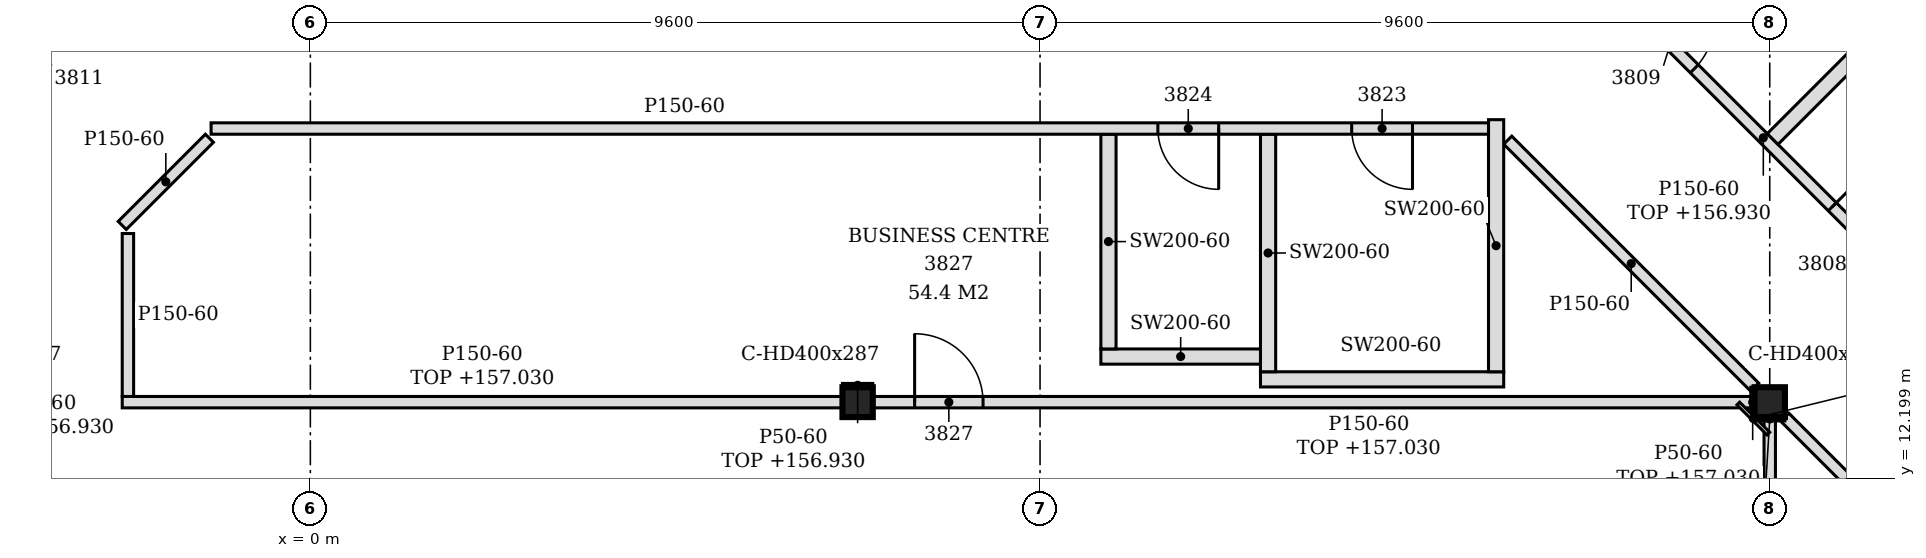
"""IFC4 building model, lengths in metres.
Left out: names, types, materials, properties, quantities, classifications, styles, units other than length and angle.
Written with IfcOpenShell. Run it as: python <this file> out.ifc"""

import sys

from ifc_helpers import new_model, si_unit, direction, frame, frame_2d, origin, origin_2d, place, context, subcontext, project, spatial, polyline, rectangle, i_section, outline, extrude, element, fill, save


model = new_model("IFC4")
c1 = context("Model", 3, precision=1e-05, world=origin(), true_north=direction((0.0, 1.0)))
c2 = subcontext(c1, "Body", "Model", "MODEL_VIEW")
j1 = project(units=[si_unit("LENGTHUNIT", "METRE"), si_unit("PLANEANGLEUNIT", "RADIAN")], contexts=[c1])
p1 = place(None, origin())
s1 = spatial("IfcSite", under=j1, at=p1, CompositionType="ELEMENT")
p2 = place(p1, origin())
s2 = spatial("IfcBuilding", under=s1, at=p2, CompositionType="ELEMENT")
p3 = place(p2, frame((0.0, 0.0, 154.2)))
s3 = spatial("IfcBuildingStorey", under=s2, at=p3, CompositionType="ELEMENT", Elevation=154.2)
for number, where, z_axis, x_axis in (
    (1, (7.2, 13.2, -0.15), (0.0, 0.0, 1.0), (1.0, 0.0, 0.0)),
    (2, (19.2, 13.2, -0.15), (0.0, 0.0, 1.0), (1.0, 0.0, 0.0)),
):
    element("IfcColumn", number, at=place(p3, frame(where, z_axis=z_axis, x_axis=x_axis)), inside=s3, PredefinedType="COLUMN", context=c2, shape_type="SweptSolid", body=[
        extrude(i_section(OverallWidth=0.399, OverallDepth=0.393, WebThickness=0.023, FlangeThickness=0.037, FilletRadius=0.015, at=origin_2d()), origin(), (0.0, 0.0, 1.0), 3.6),
    ])
p4 = place(p3, frame((19.2, 2.596, 0.0), z_axis=(0.0, 0.0, 1.0), x_axis=(0.0, 1.0, 0.0)))
e3 = element("IfcWall", 3, at=p4, inside=s3, PredefinedType="PARTITIONING", context=c2, shape_type="SweptSolid", body=[
    extrude(rectangle(XDim=10.407, YDim=0.15, at=frame_2d((5.204, 0.0))), origin(), (0.0, 0.0, 1.0), 2.83),
])
p5 = place(p4, frame((2.954, 0.0, 0.0)))
e4 = element("IfcOpeningElement", 4, at=p5, cuts=e3, PredefinedType="OPENING", context=c2, shape_type="SweptSolid", body=[
    extrude(rectangle(XDim=0.9, YDim=2.1, at=frame_2d((0.45, 1.05))), frame((0.0, 0.085, 0.0), z_axis=(0.0, -1.0, 0.0), x_axis=(1.0, 0.0, 0.0)), (0.0, 0.0, 1.0), 0.17),
])
p6 = place(p3, frame((23.872, 8.528, 0.0), z_axis=(0.0, 0.0, 1.0), x_axis=(-0.707126073897, 0.70708748795, 0.0)))
e5 = element("IfcWall", 5, at=p6, inside=s3, PredefinedType="PARTITIONING", context=c2, shape_type="SweptSolid", body=[
    extrude(rectangle(XDim=6.327, YDim=0.15, at=frame_2d((3.164, 0.0))), origin(), (0.0, 0.0, 1.0), 2.88),
])
p7 = place(p3, frame((-12.075, 9.319, 0.0), z_axis=(0.0, 0.0, 1.0), x_axis=(0.707106781187, 0.707106781187, 0.0)))
e6 = element("IfcWall", 6, at=p7, inside=s3, PredefinedType="PARTITIONING", context=c2, shape_type="SweptSolid", body=[
    extrude(rectangle(XDim=13.793, YDim=0.15, at=frame_2d((6.896, 0.0))), origin(), (0.0, 0.0, 1.0), 2.73),
])
p8 = place(p7, frame((11.692, 0.0, 0.0)))
e7 = element("IfcOpeningElement", 7, at=p8, cuts=e6, PredefinedType="OPENING", context=c2, shape_type="SweptSolid", body=[
    extrude(rectangle(XDim=0.9, YDim=2.1, at=frame_2d((0.45, 1.05))), frame((0.0, 0.085, 0.0), z_axis=(0.0, -1.0, 0.0), x_axis=(1.0, 0.0, 0.0)), (0.0, 0.0, 1.0), 0.17),
])
p9 = place(p7, frame((7.376, 0.0, 0.0)))
e8 = element("IfcOpeningElement", 8, at=p9, cuts=e6, PredefinedType="OPENING", context=c2, shape_type="SweptSolid", body=[
    extrude(rectangle(XDim=0.9, YDim=2.1, at=frame_2d((0.45, 1.05))), frame((0.0, 0.085, 0.0), z_axis=(0.0, -1.0, 0.0), x_axis=(1.0, 0.0, 0.0)), (0.0, 0.0, 1.0), 0.17),
])
p10 = place(p7, frame((3.62, 0.0, 0.0)))
e9 = element("IfcOpeningElement", 9, at=p10, cuts=e6, PredefinedType="OPENING", context=c2, shape_type="SweptSolid", body=[
    extrude(rectangle(XDim=0.9, YDim=2.1, at=frame_2d((0.45, 1.05))), frame((0.0, 0.085, 0.0), z_axis=(0.0, -1.0, 0.0), x_axis=(1.0, 0.0, 0.0)), (0.0, 0.0, 1.0), 0.17),
])
p11 = place(p3, frame((26.272, 9.522, 0.0), z_axis=(0.0, 0.0, 1.0), x_axis=(-0.707097742657, 0.707115819601, 0.0)))
e10 = element("IfcWall", 10, at=p11, inside=s3, PredefinedType="PARTITIONING", context=c2, shape_type="SweptSolid", body=[
    extrude(rectangle(XDim=13.506, YDim=0.15, at=frame_2d((6.753, 0.0))), origin(), (0.0, 0.0, 1.0), 2.73),
])
p12 = place(p11, frame((1.398, 0.0, 0.0)))
e11 = element("IfcOpeningElement", 11, at=p12, cuts=e10, PredefinedType="OPENING", context=c2, shape_type="SweptSolid", body=[
    extrude(rectangle(XDim=0.9, YDim=2.1, at=frame_2d((0.45, 1.05))), frame((0.0, 0.085, 0.0), z_axis=(0.0, -1.0, 0.0), x_axis=(1.0, 0.0, 0.0)), (0.0, 0.0, 1.0), 0.17),
])
p13 = place(p11, frame((4.668, 0.0, 0.0)))
e12 = element("IfcOpeningElement", 12, at=p13, cuts=e10, PredefinedType="OPENING", context=c2, shape_type="SweptSolid", body=[
    extrude(rectangle(XDim=0.9, YDim=2.1, at=frame_2d((0.45, 1.05))), frame((0.0, 0.085, 0.0), z_axis=(0.0, -1.0, 0.0), x_axis=(1.0, 0.0, 0.0)), (0.0, 0.0, 1.0), 0.17),
])
p14 = place(p11, frame((7.938, 0.0, 0.0)))
e13 = element("IfcOpeningElement", 13, at=p14, cuts=e10, PredefinedType="OPENING", context=c2, shape_type="SweptSolid", body=[
    extrude(rectangle(XDim=0.9, YDim=2.1, at=frame_2d((0.45, 1.05))), frame((0.0, 0.085, 0.0), z_axis=(0.0, -1.0, 0.0), x_axis=(1.0, 0.0, 0.0)), (0.0, 0.0, 1.0), 0.17),
])
p15 = place(p11, frame((11.405, 0.0, 0.0)))
e14 = element("IfcOpeningElement", 14, at=p15, cuts=e10, PredefinedType="OPENING", context=c2, shape_type="SweptSolid", body=[
    extrude(rectangle(XDim=0.9, YDim=2.1, at=frame_2d((0.45, 1.05))), frame((0.0, 0.085, 0.0), z_axis=(0.0, -1.0, 0.0), x_axis=(1.0, 0.0, 0.0)), (0.0, 0.0, 1.0), 0.17),
])
p16 = place(p3, frame((-2.475, 13.2, 0.0), z_axis=(0.0, 0.0, 1.0), x_axis=(1.0, 0.0, 0.0)))
e15 = element("IfcWall", 15, at=p16, inside=s3, PredefinedType="PARTITIONING", context=c2, shape_type="SweptSolid", body=[
    extrude(rectangle(XDim=9.476, YDim=0.15, at=frame_2d((4.738, 0.0))), origin(), (0.0, 0.0, 1.0), 2.83),
])
p17 = place(p3, frame((7.399, 13.2, 0.0), z_axis=(0.0, 0.0, 1.0), x_axis=(1.0, 0.0, 0.0)))
e16 = element("IfcWall", 16, at=p17, inside=s3, PredefinedType="PARTITIONING", context=c2, shape_type="SweptSolid", body=[
    extrude(rectangle(XDim=11.601, YDim=0.15, at=frame_2d((5.801, 0.0))), origin(), (0.0, 0.0, 1.0), 2.83),
])
p18 = place(p17, frame((0.551, 0.0, 0.0)))
e17 = element("IfcOpeningElement", 17, at=p18, cuts=e16, PredefinedType="OPENING", context=c2, shape_type="SweptSolid", body=[
    extrude(rectangle(XDim=0.9, YDim=2.1, at=frame_2d((0.45, 1.05))), frame((0.0, 0.085, 0.0), z_axis=(0.0, -1.0, 0.0), x_axis=(1.0, 0.0, 0.0)), (0.0, 0.0, 1.0), 0.17),
])
p19 = place(p3, frame((-2.4, 13.275, 0.0), z_axis=(0.0, 0.0, 1.0), x_axis=(0.0, 1.0, 0.0)))
e18 = element("IfcWall", 18, at=p19, inside=s3, PredefinedType="PARTITIONING", context=c2, shape_type="SweptSolid", body=[
    extrude(outline(polyline([(0.0, 0.0), (2.144, 0.0), (2.144, 3.45), (0.075, 3.45), (0.073, 2.83), (0.0, 2.83), (0.0, 0.0)])), frame((0.0, 0.075, 0.0), z_axis=(0.0, -1.0, 0.0), x_axis=(1.0, 0.0, 0.0)), (0.0, 0.0, 1.0), 0.15),
])
p20 = place(p3, frame((19.002, 13.398, 0.0), z_axis=(0.0, 0.0, 1.0), x_axis=(-0.707106781187, 0.707106781187, 0.0)))
e19 = element("IfcWall", 19, at=p20, inside=s3, PredefinedType="PARTITIONING", context=c2, shape_type="SweptSolid", body=[
    extrude(rectangle(XDim=4.595, YDim=0.15, at=frame_2d((2.297, 0.0))), origin(), (0.0, 0.0, 1.0), 3.45),
])
p21 = place(p3, frame((12.5, 13.5, 0.0), z_axis=(0.0, 0.0, 1.0), x_axis=(1.0, 0.0, 0.0)))
e20 = element("IfcWall", 20, at=p21, inside=s3, PredefinedType="PARTITIONING", context=c2, shape_type="SweptSolid", body=[
    extrude(rectangle(XDim=3.2, YDim=0.2, at=frame_2d((1.6, 0.0))), origin(), (0.0, 0.0, 1.0), 3.45),
])
p22 = place(p3, frame((12.6, 13.6, 0.0), z_axis=(0.0, 0.0, 1.0), x_axis=(0.0, 1.0, 0.0)))
e21 = element("IfcWall", 21, at=p22, inside=s3, PredefinedType="PARTITIONING", context=c2, shape_type="SweptSolid", body=[
    extrude(rectangle(XDim=3.125, YDim=0.2, at=frame_2d((1.562, 0.0))), origin(), (0.0, 0.0, 1.0), 3.45),
])
p23 = place(p3, frame((15.6, 13.6, 0.0), z_axis=(0.0, 0.0, 1.0), x_axis=(0.0, 1.0, 0.0)))
e22 = element("IfcWall", 22, at=p23, inside=s3, PredefinedType="PARTITIONING", context=c2, shape_type="SweptSolid", body=[
    extrude(rectangle(XDim=3.316, YDim=0.2, at=frame_2d((1.658, 0.0))), origin(), (0.0, 0.0, 1.0), 3.45),
])
p24 = place(p3, frame((10.4, 13.8, 0.0), z_axis=(0.0, 0.0, 1.0), x_axis=(1.0, 0.0, 0.0)))
e23 = element("IfcWall", 23, at=p24, inside=s3, PredefinedType="PARTITIONING", context=c2, shape_type="SweptSolid", body=[
    extrude(rectangle(XDim=2.1, YDim=0.2, at=frame_2d((1.05, 0.0))), origin(), (0.0, 0.0, 1.0), 3.45),
])
p25 = place(p3, frame((10.5, 13.9, 0.0), z_axis=(0.0, 0.0, 1.0), x_axis=(0.0, 1.0, 0.0)))
e24 = element("IfcWall", 24, at=p25, inside=s3, PredefinedType="PARTITIONING", context=c2, shape_type="SweptSolid", body=[
    extrude(rectangle(XDim=2.825, YDim=0.2, at=frame_2d((1.413, 0.0))), origin(), (0.0, 0.0, 1.0), 3.45),
])
p26 = place(p3, frame((-2.475, 15.525, 0.0), z_axis=(0.0, 0.0, 1.0), x_axis=(0.707106781187, 0.707106781187, 0.0)))
e25 = element("IfcWall", 25, at=p26, inside=s3, PredefinedType="PARTITIONING", context=c2, shape_type="SweptSolid", body=[
    extrude(rectangle(XDim=1.622, YDim=0.15, at=frame_2d((0.811, 0.0))), origin(), (0.0, 0.0, 1.0), 3.45),
])
p27 = place(p3, frame((19.238, 16.662, 0.0), z_axis=(0.0, 0.0, 1.0), x_axis=(0.707106781187, 0.707106781187, 0.0)))
e26 = element("IfcWall", 26, at=p27, inside=s3, PredefinedType="PARTITIONING", context=c2, shape_type="SweptSolid", body=[
    extrude(rectangle(XDim=8.929, YDim=0.2, at=frame_2d((4.464, 0.0))), origin(), (0.0, 0.0, 1.0), 2.73),
])
p28 = place(p3, frame((-1.306, 16.8, 0.0), z_axis=(0.0, 0.0, 1.0), x_axis=(1.0, 0.0, 0.0)))
e27 = element("IfcWall", 27, at=p28, inside=s3, PredefinedType="PARTITIONING", context=c2, shape_type="SweptSolid", body=[
    extrude(outline(polyline([(0.0, 0.0), (16.806, 0.0), (16.806, 3.45), (8.656, 3.45), (8.654, 2.73), (8.356, 2.73), (8.354, 3.45), (0.0, 3.45), (0.0, 0.0)])), frame((0.0, 0.075, 0.0), z_axis=(0.0, -1.0, 0.0), x_axis=(1.0, 0.0, 0.0)), (0.0, 0.0, 1.0), 0.15),
])
p29 = place(p28, frame((15.006, 0.0, 0.0)))
e28 = element("IfcOpeningElement", 28, at=p29, cuts=e27, PredefinedType="OPENING", context=c2, shape_type="SweptSolid", body=[
    extrude(rectangle(XDim=0.8, YDim=2.1, at=frame_2d((0.4, 1.05))), frame((0.0, 0.085, 0.0), z_axis=(0.0, -1.0, 0.0), x_axis=(1.0, 0.0, 0.0)), (0.0, 0.0, 1.0), 0.17),
])
p30 = place(p28, frame((12.456, 0.0, 0.0)))
e29 = element("IfcOpeningElement", 29, at=p30, cuts=e27, PredefinedType="OPENING", context=c2, shape_type="SweptSolid", body=[
    extrude(rectangle(XDim=0.8, YDim=2.1, at=frame_2d((0.4, 1.05))), frame((0.0, 0.085, 0.0), z_axis=(0.0, -1.0, 0.0), x_axis=(1.0, 0.0, 0.0)), (0.0, 0.0, 1.0), 0.17),
])
p31 = place(p3, frame((18.976, 13.003, 0.0), z_axis=(0.0, 0.0, 1.0), x_axis=(0.0, 1.0, 0.0)))
e30 = element("IfcWall", 30, at=p31, inside=s3, PredefinedType="PARTITIONING", context=c2, shape_type="SweptSolid", body=[
    extrude(rectangle(XDim=0.393, YDim=0.05, at=frame_2d((0.197, 0.0))), origin(), (0.0, 0.0, 1.0), 2.83),
])
p32 = place(p3, frame((19.182, 12.786, 0.0), z_axis=(0.0, 0.0, 1.0), x_axis=(-0.707106781187, 0.707106781187, 0.0)))
e31 = element("IfcWall", 31, at=p32, inside=s3, PredefinedType="PARTITIONING", context=c2, shape_type="SweptSolid", body=[
    extrude(rectangle(XDim=0.56, YDim=0.05, at=frame_2d((0.28, 0.0))), origin(), (0.0, 0.0, 1.0), 2.83),
])
p33 = place(p3, frame((7.0, 13.421, 0.0), z_axis=(0.0, 0.0, 1.0), x_axis=(1.0, 0.0, 0.0)))
e32 = element("IfcWall", 32, at=p33, inside=s3, PredefinedType="PARTITIONING", context=c2, shape_type="SweptSolid", body=[
    extrude(rectangle(XDim=0.399, YDim=0.05, at=frame_2d((0.199, 0.0))), origin(), (0.0, 0.0, 1.0), 2.73),
])
p34 = place(p3, frame((19.0, 12.979, 0.0), z_axis=(0.0, 0.0, 1.0), x_axis=(1.0, 0.0, 0.0)))
e33 = element("IfcWall", 33, at=p34, inside=s3, PredefinedType="PARTITIONING", context=c2, shape_type="SweptSolid", body=[
    extrude(rectangle(XDim=0.399, YDim=0.05, at=frame_2d((0.199, 0.0))), origin(), (0.0, 0.0, 1.0), 2.83),
])
p35 = place(p14, frame((0.9, 0.0, 0.0), z_axis=(0.0, 0.0, 1.0), x_axis=(-1.0, 0.0, 0.0)))
e34 = element("IfcDoor", 34, at=p35, inside=s3, OperationType="SINGLE_SWING_LEFT", PredefinedType="DOOR", context=c2, shape_type="SweptSolid", body=[
    extrude(rectangle(XDim=0.9, YDim=2.1, at=frame_2d((0.45, 1.05))), frame((0.0, 0.025, 0.0), z_axis=(0.0, -1.0, 0.0), x_axis=(1.0, 0.0, 0.0)), (0.0, 0.0, 1.0), 0.05),
])
fill(e13, e34)
p36 = place(p15, frame((0.9, 0.0, 0.0), z_axis=(0.0, 0.0, 1.0), x_axis=(-1.0, 0.0, 0.0)))
e35 = element("IfcDoor", 35, at=p36, inside=s3, OperationType="SINGLE_SWING_LEFT", PredefinedType="DOOR", context=c2, shape_type="SweptSolid", body=[
    extrude(rectangle(XDim=0.9, YDim=2.1, at=frame_2d((0.45, 1.05))), frame((0.0, 0.025, 0.0), z_axis=(0.0, -1.0, 0.0), x_axis=(1.0, 0.0, 0.0)), (0.0, 0.0, 1.0), 0.05),
])
fill(e14, e35)
p37 = place(p8, origin())
e36 = element("IfcDoor", 36, at=p37, inside=s3, OperationType="SINGLE_SWING_RIGHT", PredefinedType="DOOR", context=c2, shape_type="SweptSolid", body=[
    extrude(rectangle(XDim=0.9, YDim=2.1, at=frame_2d((0.45, 1.05))), frame((0.0, 0.025, 0.0), z_axis=(0.0, -1.0, 0.0), x_axis=(1.0, 0.0, 0.0)), (0.0, 0.0, 1.0), 0.05),
])
fill(e7, e36)
p38 = place(p29, frame((0.8, 0.0, 0.0), z_axis=(0.0, 0.0, 1.0), x_axis=(-1.0, 0.0, 0.0)))
e37 = element("IfcDoor", 37, at=p38, inside=s3, OperationType="SINGLE_SWING_LEFT", PredefinedType="DOOR", context=c2, shape_type="SweptSolid", body=[
    extrude(rectangle(XDim=0.8, YDim=2.1, at=frame_2d((0.4, 1.05))), frame((0.0, 0.025, 0.0), z_axis=(0.0, -1.0, 0.0), x_axis=(1.0, 0.0, 0.0)), (0.0, 0.0, 1.0), 0.05),
])
fill(e28, e37)
p39 = place(p30, frame((0.8, 0.0, 0.0), z_axis=(0.0, 0.0, 1.0), x_axis=(-1.0, 0.0, 0.0)))
e38 = element("IfcDoor", 38, at=p39, inside=s3, OperationType="SINGLE_SWING_LEFT", PredefinedType="DOOR", context=c2, shape_type="SweptSolid", body=[
    extrude(rectangle(XDim=0.8, YDim=2.1, at=frame_2d((0.4, 1.05))), frame((0.0, 0.025, 0.0), z_axis=(0.0, -1.0, 0.0), x_axis=(1.0, 0.0, 0.0)), (0.0, 0.0, 1.0), 0.05),
])
fill(e29, e38)
p40 = place(p18, origin())
e39 = element("IfcDoor", 39, at=p40, inside=s3, OperationType="SINGLE_SWING_LEFT", PredefinedType="DOOR", context=c2, shape_type="SweptSolid", body=[
    extrude(rectangle(XDim=0.9, YDim=2.1, at=frame_2d((0.45, 1.05))), frame((0.0, 0.025, 0.0), z_axis=(0.0, -1.0, 0.0), x_axis=(1.0, 0.0, 0.0)), (0.0, 0.0, 1.0), 0.05),
])
fill(e17, e39)
save(model, sys.argv[1])
